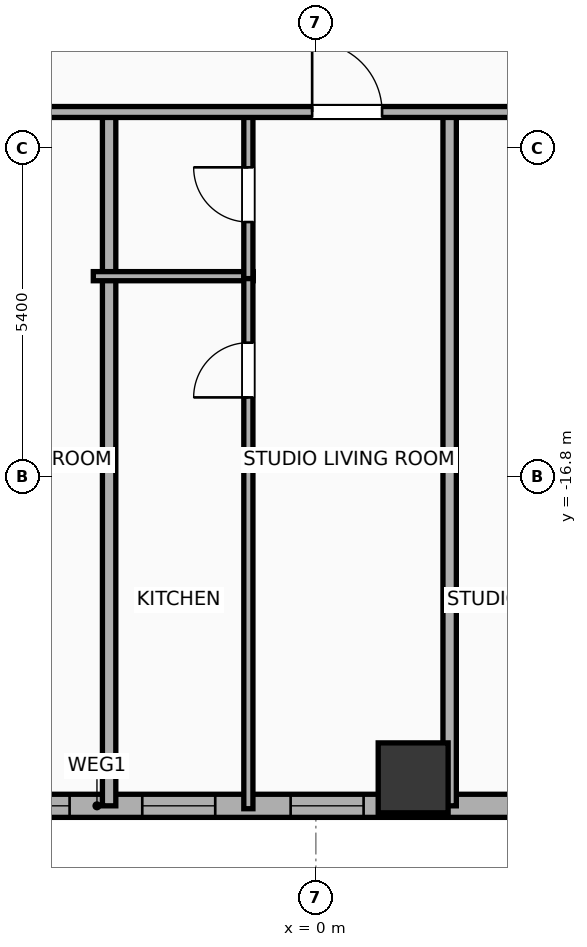
"""IFC4 building model, lengths in metres.
Left out: names, types, materials, properties, quantities, classifications, styles, units other than length and angle.
Written with IfcOpenShell. Run it as: python <this file> out.ifc"""

import sys

from ifc_helpers import new_model, si_unit, direction, frame, frame_2d, origin, origin_2d, place, context, subcontext, project, spatial, rectangle, hollow_rectangle, extrude, element, fill, save


model = new_model("IFC4")
c1 = context("Model", 3, precision=1e-05, world=origin(), true_north=direction((0.0, 1.0)))
c2 = subcontext(c1, "Body", "Model", "MODEL_VIEW")
j1 = project(units=[si_unit("LENGTHUNIT", "METRE"), si_unit("PLANEANGLEUNIT", "RADIAN")], contexts=[c1])
p1 = place(None, origin())
s1 = spatial("IfcSite", under=j1, at=p1, CompositionType="ELEMENT")
p2 = place(p1, origin())
s2 = spatial("IfcBuilding", under=s1, at=p2, CompositionType="ELEMENT")
p3 = place(p2, frame((0.0, 0.0, 29.9)))
s3 = spatial("IfcBuildingStorey", under=s2, at=p3, CompositionType="ELEMENT", Elevation=29.9)
p4 = place(p3, frame((1.6, -21.75, 0.0), z_axis=(0.0, 0.0, 1.0), x_axis=(1.0, 0.0, 0.0)))
e1 = element("IfcColumn", 1, at=p4, inside=s3, PredefinedType="COLUMN", context=c2, shape_type="SweptSolid", body=[
    extrude(hollow_rectangle(XDim=1.15, YDim=1.15, WallThickness=0.04, at=origin_2d()), origin(), (0.0, 0.0, 1.0), 3.9),
])
p5 = place(p3, frame((22.381, -22.21, 0.0), z_axis=(0.0, 0.0, 1.0), x_axis=(-1.0, 0.0, 0.0)))
e2 = element("IfcWall", 2, at=p5, inside=s3, PredefinedType="ELEMENTEDWALL", context=c2, shape_type="SweptSolid", body=[
    extrude(rectangle(XDim=51.963, YDim=0.38, at=frame_2d((25.981, 0.0))), origin(), (0.0, 0.0, 1.0), 2.54),
])
p6 = place(p5, frame((5.81, 0.0, 0.75)))
e3 = element("IfcOpeningElement", 3, at=p6, cuts=e2, PredefinedType="OPENING", context=c2, shape_type="SweptSolid", body=[
    extrude(rectangle(XDim=2.4, YDim=1.63, at=frame_2d((1.2, 0.815))), frame((0.0, 0.2, 0.0), z_axis=(0.0, -1.0, 0.0), x_axis=(1.0, 0.0, 0.0)), (0.0, 0.0, 1.0), 0.4),
])
p7 = place(p5, frame((26.431, 0.0, 0.75)))
e4 = element("IfcOpeningElement", 4, at=p7, cuts=e2, PredefinedType="OPENING", context=c2, shape_type="SweptSolid", body=[
    extrude(rectangle(XDim=2.4, YDim=1.63, at=frame_2d((1.2, 0.815))), frame((0.0, 0.2, 0.0), z_axis=(0.0, -1.0, 0.0), x_axis=(1.0, 0.0, 0.0)), (0.0, 0.0, 1.0), 0.4),
])
p8 = place(p5, frame((42.952, 0.0, 0.75)))
e5 = element("IfcOpeningElement", 5, at=p8, cuts=e2, PredefinedType="OPENING", context=c2, shape_type="SweptSolid", body=[
    extrude(rectangle(XDim=2.4, YDim=1.63, at=frame_2d((1.2, 0.815))), frame((0.0, 0.2, 0.0), z_axis=(0.0, -1.0, 0.0), x_axis=(1.0, 0.0, 0.0)), (0.0, 0.0, 1.0), 0.4),
])
p9 = place(p5, frame((49.027, 0.0, 0.75)))
e6 = element("IfcOpeningElement", 6, at=p9, cuts=e2, PredefinedType="OPENING", context=c2, shape_type="SweptSolid", body=[
    extrude(rectangle(XDim=1.2, YDim=1.63, at=frame_2d((0.6, 0.815))), frame((0.0, 0.2, 0.0), z_axis=(0.0, -1.0, 0.0), x_axis=(1.0, 0.0, 0.0)), (0.0, 0.0, 1.0), 0.4),
])
p10 = place(p5, frame((46.476, 0.0, 0.75)))
e7 = element("IfcOpeningElement", 7, at=p10, cuts=e2, PredefinedType="OPENING", context=c2, shape_type="SweptSolid", body=[
    extrude(rectangle(XDim=1.2, YDim=1.63, at=frame_2d((0.6, 0.815))), frame((0.0, 0.2, 0.0), z_axis=(0.0, -1.0, 0.0), x_axis=(1.0, 0.0, 0.0)), (0.0, 0.0, 1.0), 0.4),
])
p11 = place(p5, frame((39.181, 0.0, 0.75)))
e8 = element("IfcOpeningElement", 8, at=p11, cuts=e2, PredefinedType="OPENING", context=c2, shape_type="SweptSolid", body=[
    extrude(rectangle(XDim=1.2, YDim=1.63, at=frame_2d((0.6, 0.815))), frame((0.0, 0.2, 0.0), z_axis=(0.0, -1.0, 0.0), x_axis=(1.0, 0.0, 0.0)), (0.0, 0.0, 1.0), 0.4),
])
p12 = place(p5, frame((32.476, 0.0, 0.75)))
e9 = element("IfcOpeningElement", 9, at=p12, cuts=e2, PredefinedType="OPENING", context=c2, shape_type="SweptSolid", body=[
    extrude(rectangle(XDim=1.2, YDim=1.63, at=frame_2d((0.6, 0.815))), frame((0.0, 0.2, 0.0), z_axis=(0.0, -1.0, 0.0), x_axis=(1.0, 0.0, 0.0)), (0.0, 0.0, 1.0), 0.4),
])
p13 = place(p5, frame((35.276, 0.0, 0.75)))
e10 = element("IfcOpeningElement", 10, at=p13, cuts=e2, PredefinedType="OPENING", context=c2, shape_type="SweptSolid", body=[
    extrude(rectangle(XDim=1.2, YDim=1.63, at=frame_2d((0.6, 0.815))), frame((0.0, 0.2, 0.0), z_axis=(0.0, -1.0, 0.0), x_axis=(1.0, 0.0, 0.0)), (0.0, 0.0, 1.0), 0.4),
])
p14 = place(p5, frame((29.491, 0.0, 0.75)))
e11 = element("IfcOpeningElement", 11, at=p14, cuts=e2, PredefinedType="OPENING", context=c2, shape_type="SweptSolid", body=[
    extrude(rectangle(XDim=0.85, YDim=1.63, at=frame_2d((0.425, 0.815))), frame((0.0, 0.2, 0.0), z_axis=(0.0, -1.0, 0.0), x_axis=(1.0, 0.0, 0.0)), (0.0, 0.0, 1.0), 0.4),
])
p15 = place(p5, frame((21.596, 0.0, 0.75)))
e12 = element("IfcOpeningElement", 12, at=p15, cuts=e2, PredefinedType="OPENING", context=c2, shape_type="SweptSolid", body=[
    extrude(rectangle(XDim=1.2, YDim=1.63, at=frame_2d((0.6, 0.815))), frame((0.0, 0.2, 0.0), z_axis=(0.0, -1.0, 0.0), x_axis=(1.0, 0.0, 0.0)), (0.0, 0.0, 1.0), 0.4),
])
p16 = place(p5, frame((24.036, 0.0, 0.75)))
e13 = element("IfcOpeningElement", 13, at=p16, cuts=e2, PredefinedType="OPENING", context=c2, shape_type="SweptSolid", body=[
    extrude(rectangle(XDim=1.2, YDim=1.63, at=frame_2d((0.6, 0.815))), frame((0.0, 0.2, 0.0), z_axis=(0.0, -1.0, 0.0), x_axis=(1.0, 0.0, 0.0)), (0.0, 0.0, 1.0), 0.4),
])
p17 = place(p5, frame((17.886, 0.0, 0.75)))
e14 = element("IfcOpeningElement", 14, at=p17, cuts=e2, PredefinedType="OPENING", context=c2, shape_type="SweptSolid", body=[
    extrude(rectangle(XDim=1.2, YDim=1.63, at=frame_2d((0.6, 0.815))), frame((0.0, 0.2, 0.0), z_axis=(0.0, -1.0, 0.0), x_axis=(1.0, 0.0, 0.0)), (0.0, 0.0, 1.0), 0.4),
])
p18 = place(p5, frame((15.086, 0.0, 0.75)))
e15 = element("IfcOpeningElement", 15, at=p18, cuts=e2, PredefinedType="OPENING", context=c2, shape_type="SweptSolid", body=[
    extrude(rectangle(XDim=1.2, YDim=1.63, at=frame_2d((0.6, 0.815))), frame((0.0, 0.2, 0.0), z_axis=(0.0, -1.0, 0.0), x_axis=(1.0, 0.0, 0.0)), (0.0, 0.0, 1.0), 0.4),
])
p19 = place(p5, frame((11.181, 0.0, 0.75)))
e16 = element("IfcOpeningElement", 16, at=p19, cuts=e2, PredefinedType="OPENING", context=c2, shape_type="SweptSolid", body=[
    extrude(rectangle(XDim=1.2, YDim=1.63, at=frame_2d((0.6, 0.815))), frame((0.0, 0.2, 0.0), z_axis=(0.0, -1.0, 0.0), x_axis=(1.0, 0.0, 0.0)), (0.0, 0.0, 1.0), 0.4),
])
p20 = place(p5, frame((3.886, 0.0, 0.75)))
e17 = element("IfcOpeningElement", 17, at=p20, cuts=e2, PredefinedType="OPENING", context=c2, shape_type="SweptSolid", body=[
    extrude(rectangle(XDim=1.2, YDim=1.63, at=frame_2d((0.6, 0.815))), frame((0.0, 0.2, 0.0), z_axis=(0.0, -1.0, 0.0), x_axis=(1.0, 0.0, 0.0)), (0.0, 0.0, 1.0), 0.4),
])
p21 = place(p5, frame((1.536, 0.0, 0.75)))
e18 = element("IfcOpeningElement", 18, at=p21, cuts=e2, PredefinedType="OPENING", context=c2, shape_type="SweptSolid", body=[
    extrude(rectangle(XDim=1.2, YDim=1.63, at=frame_2d((0.6, 0.815))), frame((0.0, 0.2, 0.0), z_axis=(0.0, -1.0, 0.0), x_axis=(1.0, 0.0, 0.0)), (0.0, 0.0, 1.0), 0.4),
])
p22 = place(p3, frame((-3.4, -22.21, 0.0), z_axis=(0.0, 0.0, 1.0), x_axis=(0.0, 1.0, 0.0)))
e19 = element("IfcWall", 19, at=p22, inside=s3, PredefinedType="PARTITIONING", context=c2, shape_type="SweptSolid", body=[
    extrude(rectangle(XDim=11.49, YDim=0.22, at=frame_2d((5.745, 0.0))), origin(), (0.0, 0.0, 1.0), 3.65),
])
p23 = place(p3, frame((-3.66, -13.5, 0.0), z_axis=(0.0, 0.0, 1.0), x_axis=(1.0, 0.0, 0.0)))
e20 = element("IfcWall", 20, at=p23, inside=s3, PredefinedType="PLUMBINGWALL", context=c2, shape_type="SweptSolid", body=[
    extrude(rectangle(XDim=2.63, YDim=0.15, at=frame_2d((1.315, 0.0))), origin(), (0.0, 0.0, 1.0), 3.65),
])
p24 = place(p3, frame((-1.11, -22.258, 0.0), z_axis=(0.0, 0.0, 1.0), x_axis=(0.0, 1.0, 0.0)))
e21 = element("IfcWall", 21, at=p24, inside=s3, PredefinedType="PLUMBINGWALL", context=c2, shape_type="SweptSolid", body=[
    extrude(rectangle(XDim=8.798, YDim=0.15, at=frame_2d((4.399, 0.0))), origin(), (0.0, 0.0, 1.0), 3.65),
])
p25 = place(p24, frame((6.764, 0.0, 0.0)))
e22 = element("IfcOpeningElement", 22, at=p25, cuts=e21, PredefinedType="OPENING", context=c2, shape_type="SweptSolid", body=[
    extrude(rectangle(XDim=0.9, YDim=2.05, at=frame_2d((0.45, 1.025))), frame((0.0, 0.085, 0.0), z_axis=(0.0, -1.0, 0.0), x_axis=(1.0, 0.0, 0.0)), (0.0, 0.0, 1.0), 0.17),
])
p26 = place(p3, frame((-1.11, -13.54, 0.0), z_axis=(0.0, 0.0, 1.0), x_axis=(0.0, 1.0, 0.0)))
e23 = element("IfcWall", 23, at=p26, inside=s3, PredefinedType="PLUMBINGWALL", context=c2, shape_type="SweptSolid", body=[
    extrude(rectangle(XDim=2.76, YDim=0.15, at=frame_2d((1.38, 0.0))), origin(), (0.0, 0.0, 1.0), 3.65),
])
p27 = place(p26, frame((0.93, 0.0, 0.0)))
e24 = element("IfcOpeningElement", 24, at=p27, cuts=e23, PredefinedType="OPENING", context=c2, shape_type="SweptSolid", body=[
    extrude(rectangle(XDim=0.9, YDim=2.05, at=frame_2d((0.45, 1.025))), frame((0.0, 0.085, 0.0), z_axis=(0.0, -1.0, 0.0), x_axis=(1.0, 0.0, 0.0)), (0.0, 0.0, 1.0), 0.17),
])
p28 = place(p3, frame((2.2, -22.21, 0.0), z_axis=(0.0, 0.0, 1.0), x_axis=(0.0, 1.0, 0.0)))
e25 = element("IfcWall", 25, at=p28, inside=s3, PredefinedType="PARTITIONING", context=c2, shape_type="SweptSolid", body=[
    extrude(rectangle(XDim=11.49, YDim=0.22, at=frame_2d((5.745, 0.0))), origin(), (0.0, 0.0, 1.0), 2.54),
])
p29 = place(p3, frame((-33.41, -10.8, 0.0), z_axis=(0.0, 0.0, 1.0), x_axis=(1.0, 0.0, 0.0)))
e26 = element("IfcWall", 26, at=p29, inside=s3, PredefinedType="PARTITIONING", context=c2, shape_type="SweptSolid", body=[
    extrude(rectangle(XDim=59.62, YDim=0.18, at=frame_2d((29.81, 0.0))), origin(), (0.0, 0.0, 1.0), 3.65),
])
p30 = place(p29, frame((3.36, 0.0, 0.0)))
e27 = element("IfcOpeningElement", 27, at=p30, cuts=e26, PredefinedType="OPENING", context=c2, shape_type="SweptSolid", body=[
    extrude(rectangle(XDim=1.15, YDim=2.05, at=frame_2d((0.575, 1.025))), frame((0.0, 0.1, 0.0), z_axis=(0.0, -1.0, 0.0), x_axis=(1.0, 0.0, 0.0)), (0.0, 0.0, 1.0), 0.2),
])
p31 = place(p29, frame((10.908, 0.0, 0.0)))
e28 = element("IfcOpeningElement", 28, at=p31, cuts=e26, PredefinedType="OPENING", context=c2, shape_type="SweptSolid", body=[
    extrude(rectangle(XDim=1.15, YDim=2.05, at=frame_2d((0.575, 1.025))), frame((0.0, 0.1, 0.0), z_axis=(0.0, -1.0, 0.0), x_axis=(1.0, 0.0, 0.0)), (0.0, 0.0, 1.0), 0.2),
])
p32 = place(p29, frame((15.755, 0.0, 0.0)))
e29 = element("IfcOpeningElement", 29, at=p32, cuts=e26, PredefinedType="OPENING", context=c2, shape_type="SweptSolid", body=[
    extrude(rectangle(XDim=0.9, YDim=2.05, at=frame_2d((0.45, 1.025))), frame((0.0, 0.1, 0.0), z_axis=(0.0, -1.0, 0.0), x_axis=(1.0, 0.0, 0.0)), (0.0, 0.0, 1.0), 0.2),
])
p33 = place(p29, frame((22.11, 0.0, 0.0)))
e30 = element("IfcOpeningElement", 30, at=p33, cuts=e26, PredefinedType="OPENING", context=c2, shape_type="SweptSolid", body=[
    extrude(rectangle(XDim=1.15, YDim=2.05, at=frame_2d((0.575, 1.025))), frame((0.0, 0.1, 0.0), z_axis=(0.0, -1.0, 0.0), x_axis=(1.0, 0.0, 0.0)), (0.0, 0.0, 1.0), 0.2),
])
p34 = place(p29, frame((27.709, 0.0, 0.0)))
e31 = element("IfcOpeningElement", 31, at=p34, cuts=e26, PredefinedType="OPENING", context=c2, shape_type="SweptSolid", body=[
    extrude(rectangle(XDim=1.15, YDim=2.05, at=frame_2d((0.575, 1.025))), frame((0.0, 0.1, 0.0), z_axis=(0.0, -1.0, 0.0), x_axis=(1.0, 0.0, 0.0)), (0.0, 0.0, 1.0), 0.2),
])
p35 = place(p29, frame((33.349, 0.0, 0.0)))
e32 = element("IfcOpeningElement", 32, at=p35, cuts=e26, PredefinedType="OPENING", context=c2, shape_type="SweptSolid", body=[
    extrude(rectangle(XDim=1.15, YDim=2.05, at=frame_2d((0.575, 1.025))), frame((0.0, 0.1, 0.0), z_axis=(0.0, -1.0, 0.0), x_axis=(1.0, 0.0, 0.0)), (0.0, 0.0, 1.0), 0.2),
])
p36 = place(p29, frame((36.759, 0.0, 0.0)))
e33 = element("IfcOpeningElement", 33, at=p36, cuts=e26, PredefinedType="OPENING", context=c2, shape_type="SweptSolid", body=[
    extrude(rectangle(XDim=1.15, YDim=2.05, at=frame_2d((0.575, 1.025))), frame((0.0, 0.1, 0.0), z_axis=(0.0, -1.0, 0.0), x_axis=(1.0, 0.0, 0.0)), (0.0, 0.0, 1.0), 0.2),
])
p37 = place(p29, frame((43.752, 0.0, 0.0)))
e34 = element("IfcOpeningElement", 34, at=p37, cuts=e26, PredefinedType="OPENING", context=c2, shape_type="SweptSolid", body=[
    extrude(rectangle(XDim=0.9, YDim=2.05, at=frame_2d((0.45, 1.025))), frame((0.0, 0.1, 0.0), z_axis=(0.0, -1.0, 0.0), x_axis=(1.0, 0.0, 0.0)), (0.0, 0.0, 1.0), 0.2),
])
p38 = place(p29, frame((47.962, 0.0, 0.0)))
e35 = element("IfcOpeningElement", 35, at=p38, cuts=e26, PredefinedType="OPENING", context=c2, shape_type="SweptSolid", body=[
    extrude(rectangle(XDim=1.15, YDim=2.05, at=frame_2d((0.575, 1.025))), frame((0.0, 0.1, 0.0), z_axis=(0.0, -1.0, 0.0), x_axis=(1.0, 0.0, 0.0)), (0.0, 0.0, 1.0), 0.2),
])
p39 = place(p29, frame((55.641, 0.0, 0.0)))
e36 = element("IfcOpeningElement", 36, at=p39, cuts=e26, PredefinedType="OPENING", context=c2, shape_type="SweptSolid", body=[
    extrude(rectangle(XDim=1.15, YDim=2.05, at=frame_2d((0.575, 1.025))), frame((0.0, 0.1, 0.0), z_axis=(0.0, -1.0, 0.0), x_axis=(1.0, 0.0, 0.0)), (0.0, 0.0, 1.0), 0.2),
])
p40 = place(p7, origin())
e37 = element("IfcWindow", 37, at=p40, inside=s3, PartitioningType="SINGLE_PANEL", PredefinedType="WINDOW", context=c2, shape_type="SweptSolid", body=[
    extrude(rectangle(XDim=2.4, YDim=1.63, at=frame_2d((1.2, 0.815))), frame((0.0, 0.03, 0.0), z_axis=(0.0, -1.0, 0.0), x_axis=(1.0, 0.0, 0.0)), (0.0, 0.0, 1.0), 0.06),
])
fill(e4, e37)
p41 = place(p15, origin())
e38 = element("IfcWindow", 38, at=p41, inside=s3, PartitioningType="SINGLE_PANEL", PredefinedType="WINDOW", context=c2, shape_type="SweptSolid", body=[
    extrude(rectangle(XDim=1.2, YDim=1.63, at=frame_2d((0.6, 0.815))), frame((0.0, 0.03, 0.0), z_axis=(0.0, -1.0, 0.0), x_axis=(1.0, 0.0, 0.0)), (0.0, 0.0, 1.0), 0.06),
])
fill(e12, e38)
p42 = place(p16, origin())
e39 = element("IfcWindow", 39, at=p42, inside=s3, PartitioningType="SINGLE_PANEL", PredefinedType="WINDOW", context=c2, shape_type="SweptSolid", body=[
    extrude(rectangle(XDim=1.2, YDim=1.63, at=frame_2d((0.6, 0.815))), frame((0.0, 0.03, 0.0), z_axis=(0.0, -1.0, 0.0), x_axis=(1.0, 0.0, 0.0)), (0.0, 0.0, 1.0), 0.06),
])
fill(e13, e39)
p43 = place(p25, origin())
e40 = element("IfcDoor", 40, at=p43, inside=s3, OperationType="SINGLE_SWING_LEFT", PredefinedType="DOOR", context=c2, shape_type="SweptSolid", body=[
    extrude(rectangle(XDim=0.9, YDim=2.05, at=frame_2d((0.45, 1.025))), frame((0.0, 0.025, 0.0), z_axis=(0.0, -1.0, 0.0), x_axis=(1.0, 0.0, 0.0)), (0.0, 0.0, 1.0), 0.05),
])
fill(e22, e40)
p44 = place(p27, origin())
e41 = element("IfcDoor", 41, at=p44, inside=s3, OperationType="SINGLE_SWING_RIGHT", PredefinedType="DOOR", context=c2, shape_type="SweptSolid", body=[
    extrude(rectangle(XDim=0.9, YDim=2.05, at=frame_2d((0.45, 1.025))), frame((0.0, 0.025, 0.0), z_axis=(0.0, -1.0, 0.0), x_axis=(1.0, 0.0, 0.0)), (0.0, 0.0, 1.0), 0.05),
])
fill(e24, e41)
p45 = place(p35, origin())
e42 = element("IfcDoor", 42, at=p45, inside=s3, OperationType="SINGLE_SWING_LEFT", PredefinedType="DOOR", context=c2, shape_type="SweptSolid", body=[
    extrude(rectangle(XDim=1.15, YDim=2.05, at=frame_2d((0.575, 1.025))), frame((0.0, 0.025, 0.0), z_axis=(0.0, -1.0, 0.0), x_axis=(1.0, 0.0, 0.0)), (0.0, 0.0, 1.0), 0.05),
])
fill(e32, e42)
save(model, sys.argv[1])
